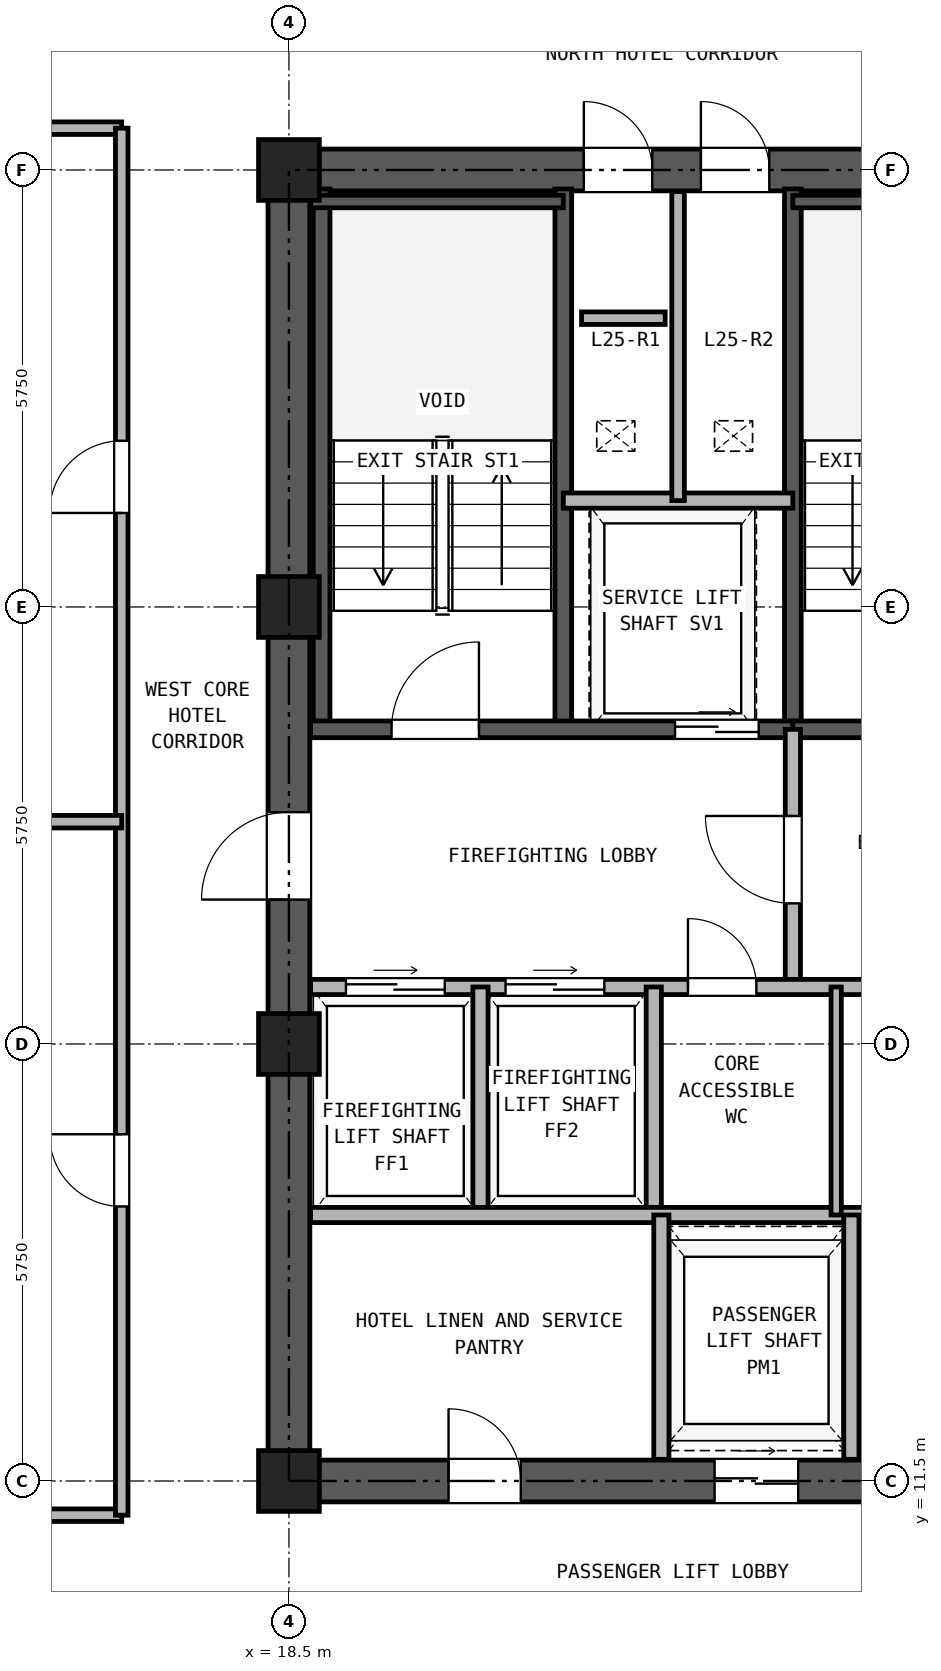
"""IFC4 building model, lengths in metres.
Left out: names, types, materials, properties, quantities, classifications, styles, units other than length and angle.
Written with IfcOpenShell. Run it as: python <this file> out.ifc"""

import sys

from ifc_helpers import new_model, si_unit, direction, frame, frame_2d, origin, origin_2d, place, context, subcontext, project, spatial, rectangle, hollow_rectangle, extrude, source, transform, mapped, element, fill, save


model = new_model("IFC4")
c1 = context("Model", 3, precision=1e-05, world=origin(), true_north=direction((0.0, 1.0)))
c2 = subcontext(c1, "Body", "Model", "MODEL_VIEW")
j1 = project(units=[si_unit("LENGTHUNIT", "METRE"), si_unit("PLANEANGLEUNIT", "RADIAN")], contexts=[c1])
p1 = place(None, origin())
s1 = spatial("IfcSite", under=j1, at=p1, CompositionType="ELEMENT")
p2 = place(p1, origin())
s2 = spatial("IfcBuilding", under=s1, at=p2, CompositionType="ELEMENT")
p3 = place(p2, frame((0.0, 0.0, 95.9)))
s3 = spatial("IfcBuildingStorey", under=s2, at=p3, CompositionType="ELEMENT", Elevation=95.9)
m1 = source(origin(), c2, "Body", "SweptSolid", [
    extrude(hollow_rectangle(XDim=0.8, YDim=0.8, WallThickness=0.045, at=origin_2d()), origin(), (0.0, 0.0, 1.0), 2.95),
])
for number, where, z_axis, x_axis in (
    (1, (18.5, 11.5, 0.0), (0.0, 0.0, 1.0), (1.0, 0.0, 0.0)),
    (2, (18.5, 17.25, 0.0), (0.0, 0.0, 1.0), (1.0, 0.0, 0.0)),
    (3, (18.5, 23.0, 0.0), (0.0, 0.0, 1.0), (1.0, 0.0, 0.0)),
    (4, (18.5, 28.75, 0.0), (0.0, 0.0, 1.0), (1.0, 0.0, 0.0)),
):
    element("IfcColumn", number, at=place(p3, frame(where, z_axis=z_axis, x_axis=x_axis)), inside=s3, PredefinedType="COLUMN", context=c2, shape_type="MappedRepresentation", body=[
        mapped(m1, transform((0.0, 0.0, 0.0), x_axis=(1.0, 0.0, 0.0), y_axis=(0.0, 1.0, 0.0), z_axis=(0.0, 0.0, 1.0), scale=1.0)),
    ])
p4 = place(p3, frame((18.225, 11.5, 0.0), z_axis=(0.0, 0.0, 1.0), x_axis=(1.0, 0.0, 0.0)))
e5 = element("IfcWall", 5, at=p4, inside=s3, PredefinedType="SHEAR", context=c2, shape_type="SweptSolid", body=[
    extrude(rectangle(XDim=10.55, YDim=0.55, at=frame_2d((5.275, 0.0))), origin(), (0.0, 0.0, 1.0), 2.95),
])
p5 = place(p4, frame((2.375, 0.0, 0.0)))
e6 = element("IfcOpeningElement", 6, at=p5, cuts=e5, PredefinedType="OPENING", context=c2, shape_type="SweptSolid", body=[
    extrude(rectangle(XDim=0.95, YDim=2.15, at=frame_2d((0.475, 1.075))), frame((0.0, 0.285, 0.0), z_axis=(0.0, -1.0, 0.0), x_axis=(1.0, 0.0, 0.0)), (0.0, 0.0, 1.0), 0.57),
])
p6 = place(p4, frame((5.875, 0.0, 0.0)))
e7 = element("IfcOpeningElement", 7, at=p6, cuts=e5, PredefinedType="OPENING", context=c2, shape_type="SweptSolid", body=[
    extrude(rectangle(XDim=1.1, YDim=2.25, at=frame_2d((0.55, 1.125))), frame((0.0, 0.285, 0.0), z_axis=(0.0, -1.0, 0.0), x_axis=(1.0, 0.0, 0.0)), (0.0, 0.0, 1.0), 0.57),
])
p7 = place(p4, frame((8.275, 0.0, 0.0)))
e8 = element("IfcOpeningElement", 8, at=p7, cuts=e5, PredefinedType="OPENING", context=c2, shape_type="SweptSolid", body=[
    extrude(rectangle(XDim=1.1, YDim=2.25, at=frame_2d((0.55, 1.125))), frame((0.0, 0.285, 0.0), z_axis=(0.0, -1.0, 0.0), x_axis=(1.0, 0.0, 0.0)), (0.0, 0.0, 1.0), 0.57),
])
p8 = place(p3, frame((18.225, 28.75, 0.0), z_axis=(0.0, 0.0, 1.0), x_axis=(1.0, 0.0, 0.0)))
e9 = element("IfcWall", 9, at=p8, inside=s3, PredefinedType="SHEAR", context=c2, shape_type="SweptSolid", body=[
    extrude(rectangle(XDim=10.55, YDim=0.55, at=frame_2d((5.275, 0.0))), origin(), (0.0, 0.0, 1.0), 2.95),
])
p9 = place(p8, frame((4.155, 0.0, 0.0)))
e10 = element("IfcOpeningElement", 10, at=p9, cuts=e9, PredefinedType="OPENING", context=c2, shape_type="SweptSolid", body=[
    extrude(rectangle(XDim=0.9, YDim=2.05, at=frame_2d((0.45, 1.025))), frame((0.0, 0.285, 0.0), z_axis=(0.0, -1.0, 0.0), x_axis=(1.0, 0.0, 0.0)), (0.0, 0.0, 1.0), 0.57),
])
p10 = place(p8, frame((5.695, 0.0, 0.0)))
e11 = element("IfcOpeningElement", 11, at=p10, cuts=e9, PredefinedType="OPENING", context=c2, shape_type="SweptSolid", body=[
    extrude(rectangle(XDim=0.9, YDim=2.05, at=frame_2d((0.45, 1.025))), frame((0.0, 0.285, 0.0), z_axis=(0.0, -1.0, 0.0), x_axis=(1.0, 0.0, 0.0)), (0.0, 0.0, 1.0), 0.57),
])
p11 = place(p3, frame((18.5, 11.775, 0.0), z_axis=(0.0, 0.0, 1.0), x_axis=(0.0, 1.0, 0.0)))
e12 = element("IfcWall", 12, at=p11, inside=s3, PredefinedType="SHEAR", context=c2, shape_type="SweptSolid", body=[
    extrude(rectangle(XDim=16.7, YDim=0.55, at=frame_2d((8.35, 0.0))), origin(), (0.0, 0.0, 1.0), 2.95),
])
p12 = place(p11, frame((7.375, 0.0, 0.0)))
e13 = element("IfcOpeningElement", 13, at=p12, cuts=e12, PredefinedType="OPENING", context=c2, shape_type="SweptSolid", body=[
    extrude(rectangle(XDim=1.15, YDim=2.2, at=frame_2d((0.575, 1.1))), frame((0.0, 0.285, 0.0), z_axis=(0.0, -1.0, 0.0), x_axis=(1.0, 0.0, 0.0)), (0.0, 0.0, 1.0), 0.57),
])
for number, where, z_axis, x_axis in (
    (14, (18.93, 21.39, 0.0), (0.0, 0.0, 1.0), (0.0, 1.0, 0.0)),
    (15, (22.11, 21.39, 0.0), (0.0, 0.0, 1.0), (0.0, 1.0, 0.0)),
    (16, (25.13, 21.39, 0.0), (0.0, 0.0, 1.0), (0.0, 1.0, 0.0)),
):
    element("IfcWall", number, at=place(p3, frame(where, z_axis=z_axis, x_axis=x_axis)), inside=s3, PredefinedType="SOLIDWALL", context=c2, shape_type="SweptSolid", body=[
        extrude(rectangle(XDim=7.11, YDim=0.22, at=frame_2d((3.555, 0.0))), origin(), (0.0, 0.0, 1.0), 2.95),
    ])
p13 = place(p3, frame((18.785, 28.335, 0.0), z_axis=(0.0, 0.0, 1.0), x_axis=(1.0, 0.0, 0.0)))
e17 = element("IfcWall", 17, at=p13, inside=s3, PredefinedType="PARTITIONING", context=c2, shape_type="SweptSolid", body=[
    extrude(rectangle(XDim=3.325, YDim=0.165, at=frame_2d((1.663, 0.0))), origin(), (0.0, 0.0, 1.0), 2.95),
])
p14 = place(p3, frame((25.13, 28.335, 0.0), z_axis=(0.0, 0.0, 1.0), x_axis=(1.0, 0.0, 0.0)))
e18 = element("IfcWall", 18, at=p14, inside=s3, PredefinedType="PARTITIONING", context=c2, shape_type="SweptSolid", body=[
    extrude(rectangle(XDim=3.085, YDim=0.165, at=frame_2d((1.542, 0.0))), origin(), (0.0, 0.0, 1.0), 2.95),
])
p15 = place(p3, frame((18.785, 21.39, 0.0), z_axis=(0.0, 0.0, 1.0), x_axis=(1.0, 0.0, 0.0)))
e19 = element("IfcWall", 19, at=p15, inside=s3, PredefinedType="SOLIDWALL", context=c2, shape_type="SweptSolid", body=[
    extrude(rectangle(XDim=6.345, YDim=0.22, at=frame_2d((3.172, 0.0))), origin(), (0.0, 0.0, 1.0), 2.95),
])
p16 = place(p15, frame((1.065, 0.0, 0.0)))
e20 = element("IfcOpeningElement", 20, at=p16, cuts=e19, PredefinedType="OPENING", context=c2, shape_type="SweptSolid", body=[
    extrude(rectangle(XDim=1.15, YDim=2.2, at=frame_2d((0.575, 1.1))), frame((0.0, 0.12, 0.0), z_axis=(0.0, -1.0, 0.0), x_axis=(1.0, 0.0, 0.0)), (0.0, 0.0, 1.0), 0.24),
])
p17 = place(p15, frame((4.795, 0.0, 0.0)))
e21 = element("IfcOpeningElement", 21, at=p17, cuts=e19, PredefinedType="OPENING", context=c2, shape_type="SweptSolid", body=[
    extrude(rectangle(XDim=1.1, YDim=2.25, at=frame_2d((0.55, 1.125))), frame((0.0, 0.12, 0.0), z_axis=(0.0, -1.0, 0.0), x_axis=(1.0, 0.0, 0.0)), (0.0, 0.0, 1.0), 0.24),
])
p18 = place(p3, frame((25.13, 21.39, 0.0), z_axis=(0.0, 0.0, 1.0), x_axis=(1.0, 0.0, 0.0)))
e22 = element("IfcWall", 22, at=p18, inside=s3, PredefinedType="SOLIDWALL", context=c2, shape_type="SweptSolid", body=[
    extrude(rectangle(XDim=3.085, YDim=0.22, at=frame_2d((1.542, 0.0))), origin(), (0.0, 0.0, 1.0), 2.95),
])
p19 = place(p18, frame((0.92, 0.0, 0.0)))
e23 = element("IfcOpeningElement", 23, at=p19, cuts=e22, PredefinedType="OPENING", context=c2, shape_type="SweptSolid", body=[
    extrude(rectangle(XDim=1.15, YDim=2.2, at=frame_2d((0.575, 1.1))), frame((0.0, 0.12, 0.0), z_axis=(0.0, -1.0, 0.0), x_axis=(1.0, 0.0, 0.0)), (0.0, 0.0, 1.0), 0.24),
])
p20 = place(p3, frame((22.11, 24.4, 0.0), z_axis=(0.0, 0.0, 1.0), x_axis=(1.0, 0.0, 0.0)))
e24 = element("IfcWall", 24, at=p20, inside=s3, PredefinedType="PARTITIONING", context=c2, shape_type="SweptSolid", body=[
    extrude(rectangle(XDim=3.02, YDim=0.2, at=frame_2d((1.51, 0.0))), origin(), (0.0, 0.0, 1.0), 2.95),
])
p21 = place(p3, frame((23.62, 24.4, 0.0), z_axis=(0.0, 0.0, 1.0), x_axis=(0.0, 1.0, 0.0)))
e25 = element("IfcWall", 25, at=p21, inside=s3, PredefinedType="PARTITIONING", context=c2, shape_type="SweptSolid", body=[
    extrude(rectangle(XDim=4.065, YDim=0.165, at=frame_2d((2.033, 0.0))), origin(), (0.0, 0.0, 1.0), 2.95),
])
p22 = place(p3, frame((25.13, 18.0, 0.0), z_axis=(0.0, 0.0, 1.0), x_axis=(0.0, 1.0, 0.0)))
e26 = element("IfcWall", 26, at=p22, inside=s3, PredefinedType="PARTITIONING", context=c2, shape_type="SweptSolid", body=[
    extrude(rectangle(XDim=3.39, YDim=0.2, at=frame_2d((1.695, 0.0))), origin(), (0.0, 0.0, 1.0), 2.95),
])
p23 = place(p22, frame((1.1, 0.0, 0.0)))
e27 = element("IfcOpeningElement", 27, at=p23, cuts=e26, PredefinedType="OPENING", context=c2, shape_type="SweptSolid", body=[
    extrude(rectangle(XDim=1.15, YDim=2.2, at=frame_2d((0.575, 1.1))), frame((0.0, 0.11, 0.0), z_axis=(0.0, -1.0, 0.0), x_axis=(1.0, 0.0, 0.0)), (0.0, 0.0, 1.0), 0.22),
])
p24 = place(p3, frame((18.785, 18.0, 0.0), z_axis=(0.0, 0.0, 1.0), x_axis=(1.0, 0.0, 0.0)))
e28 = element("IfcWall", 28, at=p24, inside=s3, PredefinedType="PARTITIONING", context=c2, shape_type="SweptSolid", body=[
    extrude(rectangle(XDim=9.43, YDim=0.2, at=frame_2d((4.715, 0.0))), origin(), (0.0, 0.0, 1.0), 2.95),
])
p25 = place(p24, frame((0.465, 0.0, 0.0)))
e29 = element("IfcOpeningElement", 29, at=p25, cuts=e28, PredefinedType="OPENING", context=c2, shape_type="SweptSolid", body=[
    extrude(rectangle(XDim=1.3, YDim=2.3, at=frame_2d((0.65, 1.15))), frame((0.0, 0.11, 0.0), z_axis=(0.0, -1.0, 0.0), x_axis=(1.0, 0.0, 0.0)), (0.0, 0.0, 1.0), 0.22),
])
p26 = place(p24, frame((2.565, 0.0, 0.0)))
e30 = element("IfcOpeningElement", 30, at=p26, cuts=e28, PredefinedType="OPENING", context=c2, shape_type="SweptSolid", body=[
    extrude(rectangle(XDim=1.3, YDim=2.3, at=frame_2d((0.65, 1.15))), frame((0.0, 0.11, 0.0), z_axis=(0.0, -1.0, 0.0), x_axis=(1.0, 0.0, 0.0)), (0.0, 0.0, 1.0), 0.22),
])
p27 = place(p24, frame((4.965, 0.0, 0.0)))
e31 = element("IfcOpeningElement", 31, at=p27, cuts=e28, PredefinedType="OPENING", context=c2, shape_type="SweptSolid", body=[
    extrude(rectangle(XDim=0.9, YDim=2.05, at=frame_2d((0.45, 1.025))), frame((0.0, 0.11, 0.0), z_axis=(0.0, -1.0, 0.0), x_axis=(1.0, 0.0, 0.0)), (0.0, 0.0, 1.0), 0.22),
])
p28 = place(p24, frame((7.665, 0.0, 0.0)))
e32 = element("IfcOpeningElement", 32, at=p28, cuts=e28, PredefinedType="OPENING", context=c2, shape_type="SweptSolid", body=[
    extrude(rectangle(XDim=0.9, YDim=2.05, at=frame_2d((0.45, 1.025))), frame((0.0, 0.11, 0.0), z_axis=(0.0, -1.0, 0.0), x_axis=(1.0, 0.0, 0.0)), (0.0, 0.0, 1.0), 0.22),
])
for number, where, z_axis, x_axis in (
    (33, (21.02, 15.0, 0.0), (0.0, 0.0, 1.0), (0.0, 1.0, 0.0)),
    (34, (23.3, 15.0, 0.0), (0.0, 0.0, 1.0), (0.0, 1.0, 0.0)),
):
    element("IfcWall", number, at=place(p3, frame(where, z_axis=z_axis, x_axis=x_axis)), inside=s3, PredefinedType="PARTITIONING", context=c2, shape_type="SweptSolid", body=[
        extrude(rectangle(XDim=3.0, YDim=0.2, at=frame_2d((1.5, 0.0))), origin(), (0.0, 0.0, 1.0), 2.95),
    ])
p29 = place(p3, frame((18.785, 15.0, 0.0), z_axis=(0.0, 0.0, 1.0), x_axis=(1.0, 0.0, 0.0)))
e35 = element("IfcWall", 35, at=p29, inside=s3, PredefinedType="PARTITIONING", context=c2, shape_type="SweptSolid", body=[
    extrude(rectangle(XDim=9.43, YDim=0.2, at=frame_2d((4.715, 0.0))), origin(), (0.0, 0.0, 1.0), 2.95),
])
p30 = place(p3, frame((25.7, 15.0, 0.0), z_axis=(0.0, 0.0, 1.0), x_axis=(0.0, 1.0, 0.0)))
e36 = element("IfcWall", 36, at=p30, inside=s3, PredefinedType="PARTITIONING", context=c2, shape_type="SweptSolid", body=[
    extrude(rectangle(XDim=3.0, YDim=0.135, at=frame_2d((1.5, 0.0))), origin(), (0.0, 0.0, 1.0), 2.95),
])
for number, where, z_axis, x_axis in (
    (37, (23.4, 11.785, 0.0), (0.0, 0.0, 1.0), (0.0, 1.0, 0.0)),
    (38, (25.9, 11.785, 0.0), (0.0, 0.0, 1.0), (0.0, 1.0, 0.0)),
):
    element("IfcWall", number, at=place(p3, frame(where, z_axis=z_axis, x_axis=x_axis)), inside=s3, PredefinedType="PARTITIONING", context=c2, shape_type="SweptSolid", body=[
        extrude(rectangle(XDim=3.215, YDim=0.2, at=frame_2d((1.607, 0.0))), origin(), (0.0, 0.0, 1.0), 2.95),
    ])
for number, where, z_axis, x_axis in (
    (39, (6.8, 11.05, 0.0), (0.0, 0.0, 1.0), (1.0, 0.0, 0.0)),
    (40, (6.8, 29.3, 0.0), (0.0, 0.0, 1.0), (1.0, 0.0, 0.0)),
):
    element("IfcWall", number, at=place(p3, frame(where, z_axis=z_axis, x_axis=x_axis)), inside=s3, PredefinedType="PARTITIONING", context=c2, shape_type="SweptSolid", body=[
        extrude(rectangle(XDim=9.5, YDim=0.165, at=frame_2d((4.75, 0.0))), origin(), (0.0, 0.0, 1.0), 2.95),
    ])
p31 = place(p3, frame((16.3, 11.05, 0.0), z_axis=(0.0, 0.0, 1.0), x_axis=(0.0, 1.0, 0.0)))
e41 = element("IfcWall", 41, at=p31, inside=s3, PredefinedType="PARTITIONING", context=c2, shape_type="SweptSolid", body=[
    extrude(rectangle(XDim=18.25, YDim=0.165, at=frame_2d((9.125, 0.0))), origin(), (0.0, 0.0, 1.0), 2.95),
])
p32 = place(p31, frame((4.062, 0.0, 0.0)))
e42 = element("IfcOpeningElement", 42, at=p32, cuts=e41, PredefinedType="OPENING", context=c2, shape_type="SweptSolid", body=[
    extrude(rectangle(XDim=0.95, YDim=2.15, at=frame_2d((0.475, 1.075))), frame((0.0, 0.093, 0.0), z_axis=(0.0, -1.0, 0.0), x_axis=(1.0, 0.0, 0.0)), (0.0, 0.0, 1.0), 0.185),
])
p33 = place(p31, frame((13.187, 0.0, 0.0)))
e43 = element("IfcOpeningElement", 43, at=p33, cuts=e41, PredefinedType="OPENING", context=c2, shape_type="SweptSolid", body=[
    extrude(rectangle(XDim=0.95, YDim=2.15, at=frame_2d((0.475, 1.075))), frame((0.0, 0.093, 0.0), z_axis=(0.0, -1.0, 0.0), x_axis=(1.0, 0.0, 0.0)), (0.0, 0.0, 1.0), 0.185),
])
p34 = place(p3, frame((0.16, 20.175, 0.0), z_axis=(0.0, 0.0, 1.0), x_axis=(1.0, 0.0, 0.0)))
e44 = element("IfcWall", 44, at=p34, inside=s3, PredefinedType="PARTITIONING", context=c2, shape_type="SweptSolid", body=[
    extrude(rectangle(XDim=16.14, YDim=0.165, at=frame_2d((8.07, 0.0))), origin(), (0.0, 0.0, 1.0), 2.583),
])
p35 = place(p3, frame((22.35, 26.8, 0.0), z_axis=(0.0, 0.0, 1.0), x_axis=(1.0, 0.0, 0.0)))
e45 = element("IfcWall", 45, at=p35, inside=s3, PredefinedType="PARTITIONING", context=c2, shape_type="SweptSolid", body=[
    extrude(rectangle(XDim=1.1, YDim=0.165, at=frame_2d((0.55, 0.0))), origin(), (0.0, 0.0, 1.0), 2.95),
])
p36 = place(p16, frame((1.15, 0.0, 0.0), z_axis=(0.0, 0.0, 1.0), x_axis=(-1.0, 0.0, 0.0)))
e46 = element("IfcDoor", 46, at=p36, inside=s3, OperationType="SINGLE_SWING_RIGHT", PredefinedType="DOOR", context=c2, shape_type="SweptSolid", body=[
    extrude(rectangle(XDim=1.15, YDim=2.2, at=frame_2d((0.575, 1.1))), frame((0.0, 0.025, 0.0), z_axis=(0.0, -1.0, 0.0), x_axis=(1.0, 0.0, 0.0)), (0.0, 0.0, 1.0), 0.05),
])
fill(e20, e46)
p37 = place(p17, frame((1.1, 0.0, 0.0), z_axis=(0.0, 0.0, 1.0), x_axis=(-1.0, 0.0, 0.0)))
e47 = element("IfcDoor", 47, at=p37, inside=s3, OperationType="DOUBLE_DOOR_SLIDING", PredefinedType="DOOR", context=c2, shape_type="SweptSolid", body=[
    extrude(rectangle(XDim=1.1, YDim=2.25, at=frame_2d((0.55, 1.125))), frame((0.0, 0.025, 0.0), z_axis=(0.0, -1.0, 0.0), x_axis=(1.0, 0.0, 0.0)), (0.0, 0.0, 1.0), 0.05),
])
fill(e21, e47)
p38 = place(p23, origin())
e48 = element("IfcDoor", 48, at=p38, inside=s3, OperationType="SINGLE_SWING_RIGHT", PredefinedType="DOOR", context=c2, shape_type="SweptSolid", body=[
    extrude(rectangle(XDim=1.15, YDim=2.2, at=frame_2d((0.575, 1.1))), frame((0.0, 0.025, 0.0), z_axis=(0.0, -1.0, 0.0), x_axis=(1.0, 0.0, 0.0)), (0.0, 0.0, 1.0), 0.05),
])
fill(e27, e48)
p39 = place(p25, origin())
e49 = element("IfcDoor", 49, at=p39, inside=s3, OperationType="DOUBLE_DOOR_SLIDING", PredefinedType="DOOR", context=c2, shape_type="SweptSolid", body=[
    extrude(rectangle(XDim=1.3, YDim=2.3, at=frame_2d((0.65, 1.15))), frame((0.0, 0.025, 0.0), z_axis=(0.0, -1.0, 0.0), x_axis=(1.0, 0.0, 0.0)), (0.0, 0.0, 1.0), 0.05),
])
fill(e29, e49)
p40 = place(p26, origin())
e50 = element("IfcDoor", 50, at=p40, inside=s3, OperationType="DOUBLE_DOOR_SLIDING", PredefinedType="DOOR", context=c2, shape_type="SweptSolid", body=[
    extrude(rectangle(XDim=1.3, YDim=2.3, at=frame_2d((0.65, 1.15))), frame((0.0, 0.025, 0.0), z_axis=(0.0, -1.0, 0.0), x_axis=(1.0, 0.0, 0.0)), (0.0, 0.0, 1.0), 0.05),
])
fill(e30, e50)
p41 = place(p27, frame((0.9, 0.0, 0.0), z_axis=(0.0, 0.0, 1.0), x_axis=(-1.0, 0.0, 0.0)))
e51 = element("IfcDoor", 51, at=p41, inside=s3, OperationType="SINGLE_SWING_LEFT", PredefinedType="DOOR", context=c2, shape_type="SweptSolid", body=[
    extrude(rectangle(XDim=0.9, YDim=2.05, at=frame_2d((0.45, 1.025))), frame((0.0, 0.025, 0.0), z_axis=(0.0, -1.0, 0.0), x_axis=(1.0, 0.0, 0.0)), (0.0, 0.0, 1.0), 0.05),
])
fill(e31, e51)
p42 = place(p12, frame((1.15, 0.0, 0.0), z_axis=(0.0, 0.0, 1.0), x_axis=(-1.0, 0.0, 0.0)))
e52 = element("IfcDoor", 52, at=p42, inside=s3, OperationType="SINGLE_SWING_LEFT", PredefinedType="DOOR", context=c2, shape_type="SweptSolid", body=[
    extrude(rectangle(XDim=1.15, YDim=2.2, at=frame_2d((0.575, 1.1))), frame((0.0, 0.025, 0.0), z_axis=(0.0, -1.0, 0.0), x_axis=(1.0, 0.0, 0.0)), (0.0, 0.0, 1.0), 0.05),
])
fill(e13, e52)
p43 = place(p9, origin())
e53 = element("IfcDoor", 53, at=p43, inside=s3, OperationType="SINGLE_SWING_LEFT", PredefinedType="DOOR", context=c2, shape_type="SweptSolid", body=[
    extrude(rectangle(XDim=0.9, YDim=2.05, at=frame_2d((0.45, 1.025))), frame((0.0, 0.025, 0.0), z_axis=(0.0, -1.0, 0.0), x_axis=(1.0, 0.0, 0.0)), (0.0, 0.0, 1.0), 0.05),
])
fill(e10, e53)
p44 = place(p10, origin())
e54 = element("IfcDoor", 54, at=p44, inside=s3, OperationType="SINGLE_SWING_LEFT", PredefinedType="DOOR", context=c2, shape_type="SweptSolid", body=[
    extrude(rectangle(XDim=0.9, YDim=2.05, at=frame_2d((0.45, 1.025))), frame((0.0, 0.025, 0.0), z_axis=(0.0, -1.0, 0.0), x_axis=(1.0, 0.0, 0.0)), (0.0, 0.0, 1.0), 0.05),
])
fill(e11, e54)
p45 = place(p5, frame((0.95, 0.0, 0.0), z_axis=(0.0, 0.0, 1.0), x_axis=(-1.0, 0.0, 0.0)))
e55 = element("IfcDoor", 55, at=p45, inside=s3, OperationType="SINGLE_SWING_LEFT", PredefinedType="DOOR", context=c2, shape_type="SweptSolid", body=[
    extrude(rectangle(XDim=0.95, YDim=2.15, at=frame_2d((0.475, 1.075))), frame((0.0, 0.025, 0.0), z_axis=(0.0, -1.0, 0.0), x_axis=(1.0, 0.0, 0.0)), (0.0, 0.0, 1.0), 0.05),
])
fill(e6, e55)
p46 = place(p6, frame((1.1, 0.0, 0.0), z_axis=(0.0, 0.0, 1.0), x_axis=(-1.0, 0.0, 0.0)))
e56 = element("IfcDoor", 56, at=p46, inside=s3, OperationType="DOUBLE_DOOR_SLIDING", PredefinedType="DOOR", context=c2, shape_type="SweptSolid", body=[
    extrude(rectangle(XDim=1.1, YDim=2.25, at=frame_2d((0.55, 1.125))), frame((0.0, 0.025, 0.0), z_axis=(0.0, -1.0, 0.0), x_axis=(1.0, 0.0, 0.0)), (0.0, 0.0, 1.0), 0.05),
])
fill(e7, e56)
p47 = place(p32, frame((0.95, 0.0, 0.0), z_axis=(0.0, 0.0, 1.0), x_axis=(-1.0, 0.0, 0.0)))
e57 = element("IfcDoor", 57, at=p47, inside=s3, OperationType="SINGLE_SWING_RIGHT", PredefinedType="DOOR", context=c2, shape_type="SweptSolid", body=[
    extrude(rectangle(XDim=0.95, YDim=2.15, at=frame_2d((0.475, 1.075))), frame((0.0, 0.025, 0.0), z_axis=(0.0, -1.0, 0.0), x_axis=(1.0, 0.0, 0.0)), (0.0, 0.0, 1.0), 0.05),
])
fill(e42, e57)
p48 = place(p33, frame((0.95, 0.0, 0.0), z_axis=(0.0, 0.0, 1.0), x_axis=(-1.0, 0.0, 0.0)))
e58 = element("IfcDoor", 58, at=p48, inside=s3, OperationType="SINGLE_SWING_LEFT", PredefinedType="DOOR", context=c2, shape_type="SweptSolid", body=[
    extrude(rectangle(XDim=0.95, YDim=2.15, at=frame_2d((0.475, 1.075))), frame((0.0, 0.025, 0.0), z_axis=(0.0, -1.0, 0.0), x_axis=(1.0, 0.0, 0.0)), (0.0, 0.0, 1.0), 0.05),
])
fill(e43, e58)
save(model, sys.argv[1])
